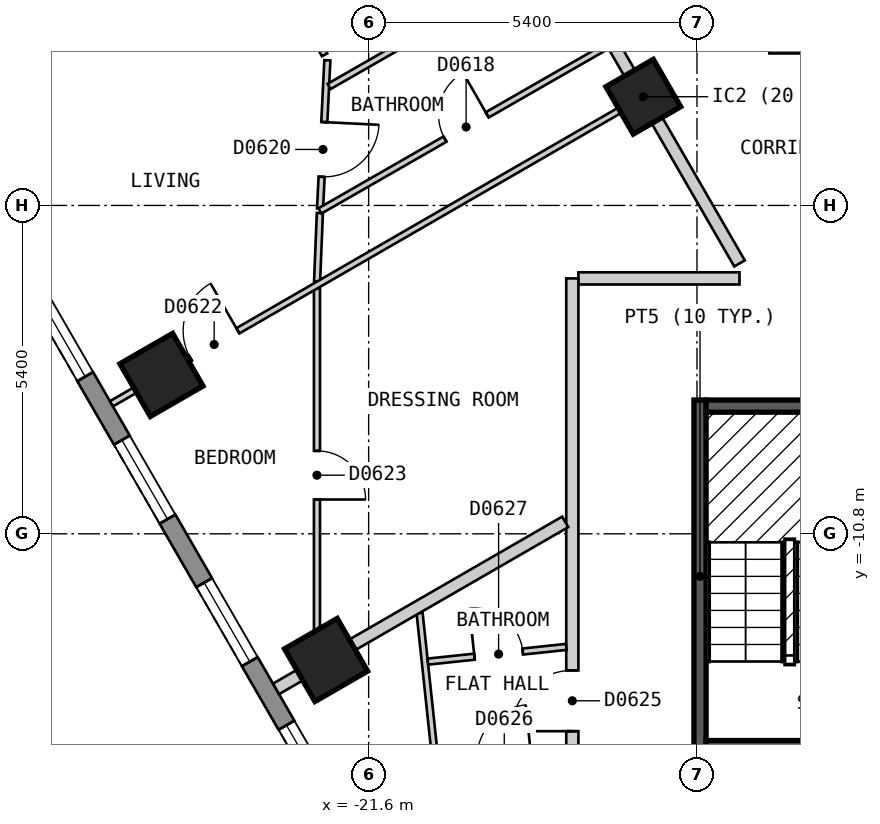
"""IFC4 building model, lengths in metres.
Left out: names, types, materials, properties, quantities, classifications, styles, units other than length and angle.
Written with IfcOpenShell. Run it as: python <this file> out.ifc"""

import sys

from ifc_helpers import new_model, si_unit, direction, frame, frame_2d, origin, origin_2d, place, context, subcontext, project, spatial, polyline, rectangle, outline, extrude, element, fill, save


model = new_model("IFC4")
c1 = context("Model", 3, precision=1e-05, world=origin(), true_north=direction((0.0, 1.0)))
c2 = subcontext(c1, "Body", "Model", "MODEL_VIEW")
j1 = project(units=[si_unit("LENGTHUNIT", "METRE"), si_unit("PLANEANGLEUNIT", "RADIAN")], contexts=[c1])
p1 = place(None, origin())
s1 = spatial("IfcSite", under=j1, at=p1, CompositionType="ELEMENT")
p2 = place(p1, origin())
s2 = spatial("IfcBuilding", under=s1, at=p2, CompositionType="ELEMENT")
p3 = place(p2, frame((0.0, 0.0, 75.0)))
s3 = spatial("IfcBuildingStorey", under=s2, at=p3, CompositionType="ELEMENT", Elevation=75.0)
for number, where, z_axis, x_axis in (
    (1, (-25.007, -8.187, 0.0), (0.0, 0.0, 1.0), (0.5, -0.866, 0.0)),
    (2, (-22.3, -12.875, 0.0), (0.0, 0.0, 1.0), (0.5, -0.866, 0.0)),
):
    element("IfcColumn", number, at=place(p3, frame(where, z_axis=z_axis, x_axis=x_axis)), inside=s3, PredefinedType="COLUMN", context=c2, shape_type="SweptSolid", body=[
        extrude(rectangle(XDim=1.0, YDim=1.0, at=origin_2d()), origin(), (0.0, 0.0, 1.0), 3.0),
    ])
p4 = place(p3, frame((-17.083, -3.612, 0.0), z_axis=(0.0, 0.0, 1.0), x_axis=(0.5, -0.866025403784, 0.0)))
e3 = element("IfcColumn", 3, at=p4, inside=s3, PredefinedType="COLUMN", context=c2, shape_type="SweptSolid", body=[
    extrude(rectangle(XDim=0.9, YDim=0.9, at=origin_2d()), origin(), (0.0, 0.0, 1.0), 3.0),
])
p5 = place(p3, frame((-29.027, -3.425, 0.0), z_axis=(0.0, 0.0, 1.0), x_axis=(0.500035407905, -0.866004960056, 0.0)))
e4 = element("IfcWall", 4, at=p5, inside=s3, PredefinedType="SOLIDWALL", context=c2, shape_type="SweptSolid", body=[
    extrude(outline(polyline([(0.0, -0.15), (23.094, -0.15), (23.014, 0.15), (0.08, 0.15), (0.0, -0.15)])), origin(), (0.0, 0.0, 1.0), 2.7),
])
p6 = place(p5, frame((1.324, 0.0, 0.15)))
e5 = element("IfcOpeningElement", 5, at=p6, cuts=e4, PredefinedType="OPENING", context=c2, shape_type="SweptSolid", body=[
    extrude(rectangle(XDim=1.5, YDim=2.1, at=frame_2d((0.75, 1.05))), frame((0.0, 0.16, 0.0), z_axis=(0.0, -1.0, 0.0), x_axis=(1.0, 0.0, 0.0)), (0.0, 0.0, 1.0), 0.32),
])
p7 = place(p5, frame((4.031, 0.0, 0.15)))
e6 = element("IfcOpeningElement", 6, at=p7, cuts=e4, PredefinedType="OPENING", context=c2, shape_type="SweptSolid", body=[
    extrude(rectangle(XDim=1.5, YDim=2.1, at=frame_2d((0.75, 1.05))), frame((0.0, 0.16, 0.0), z_axis=(0.0, -1.0, 0.0), x_axis=(1.0, 0.0, 0.0)), (0.0, 0.0, 1.0), 0.32),
])
p8 = place(p5, frame((6.737, 0.0, 0.15)))
e7 = element("IfcOpeningElement", 7, at=p8, cuts=e4, PredefinedType="OPENING", context=c2, shape_type="SweptSolid", body=[
    extrude(rectangle(XDim=1.5, YDim=2.1, at=frame_2d((0.75, 1.05))), frame((0.0, 0.16, 0.0), z_axis=(0.0, -1.0, 0.0), x_axis=(1.0, 0.0, 0.0)), (0.0, 0.0, 1.0), 0.32),
])
p9 = place(p5, frame((9.444, 0.0, 0.15)))
e8 = element("IfcOpeningElement", 8, at=p9, cuts=e4, PredefinedType="OPENING", context=c2, shape_type="SweptSolid", body=[
    extrude(rectangle(XDim=1.5, YDim=2.1, at=frame_2d((0.75, 1.05))), frame((0.0, 0.16, 0.0), z_axis=(0.0, -1.0, 0.0), x_axis=(1.0, 0.0, 0.0)), (0.0, 0.0, 1.0), 0.32),
])
p10 = place(p5, frame((12.151, 0.0, 0.15)))
e9 = element("IfcOpeningElement", 9, at=p10, cuts=e4, PredefinedType="OPENING", context=c2, shape_type="SweptSolid", body=[
    extrude(rectangle(XDim=1.5, YDim=2.1, at=frame_2d((0.75, 1.05))), frame((0.0, 0.16, 0.0), z_axis=(0.0, -1.0, 0.0), x_axis=(1.0, 0.0, 0.0)), (0.0, 0.0, 1.0), 0.32),
])
p11 = place(p5, frame((14.857, 0.0, 0.15)))
e10 = element("IfcOpeningElement", 10, at=p11, cuts=e4, PredefinedType="OPENING", context=c2, shape_type="SweptSolid", body=[
    extrude(rectangle(XDim=1.5, YDim=2.1, at=frame_2d((0.75, 1.05))), frame((0.0, 0.16, 0.0), z_axis=(0.0, -1.0, 0.0), x_axis=(1.0, 0.0, 0.0)), (0.0, 0.0, 1.0), 0.32),
])
p12 = place(p5, frame((17.564, 0.0, 0.15)))
e11 = element("IfcOpeningElement", 11, at=p12, cuts=e4, PredefinedType="OPENING", context=c2, shape_type="SweptSolid", body=[
    extrude(rectangle(XDim=1.5, YDim=2.1, at=frame_2d((0.75, 1.05))), frame((0.0, 0.16, 0.0), z_axis=(0.0, -1.0, 0.0), x_axis=(1.0, 0.0, 0.0)), (0.0, 0.0, 1.0), 0.32),
])
p13 = place(p5, frame((20.27, 0.0, 0.15)))
e12 = element("IfcOpeningElement", 12, at=p13, cuts=e4, PredefinedType="OPENING", context=c2, shape_type="SweptSolid", body=[
    extrude(rectangle(XDim=1.5, YDim=2.1, at=frame_2d((0.75, 1.05))), frame((0.0, 0.16, 0.0), z_axis=(0.0, -1.0, 0.0), x_axis=(1.0, 0.0, 0.0)), (0.0, 0.0, 1.0), 0.32),
])
p14 = place(p3, frame((-18.533, -1.101, 0.0), z_axis=(0.0, 0.0, 1.0), x_axis=(0.500022085096, -0.866012652573, 0.0)))
e13 = element("IfcWall", 13, at=p14, inside=s3, PredefinedType="PARTITIONING", context=c2, shape_type="SweptSolid", body=[
    extrude(rectangle(XDim=6.066, YDim=0.2, at=frame_2d((3.033, 0.0))), origin(), (0.0, 0.0, 1.0), 2.7),
])
p15 = place(p14, frame((0.532, 0.0, 0.0)))
e14 = element("IfcOpeningElement", 14, at=p15, cuts=e13, PredefinedType="OPENING", context=c2, shape_type="SweptSolid", body=[
    extrude(rectangle(XDim=1.0, YDim=2.1, at=frame_2d((0.5, 1.05))), frame((0.0, 0.11, 0.0), z_axis=(0.0, -1.0, 0.0), x_axis=(1.0, 0.0, 0.0)), (0.0, 0.0, 1.0), 0.22),
])
p16 = place(p3, frame((-18.15, -6.6, 0.0), z_axis=(0.0, 0.0, 1.0), x_axis=(1.0, 0.0, 0.0)))
e15 = element("IfcWall", 15, at=p16, inside=s3, PredefinedType="PARTITIONING", context=c2, shape_type="SweptSolid", body=[
    extrude(rectangle(XDim=2.649, YDim=0.2, at=frame_2d((1.324, 0.0))), origin(), (0.0, 0.0, 1.0), 2.7),
])
p17 = place(p3, frame((-15.011, -2.8, 0.0), z_axis=(0.0, 0.0, 1.0), x_axis=(1.0, 0.0, 0.0)))
e16 = element("IfcWall", 16, at=p17, inside=s3, PredefinedType="PARTITIONING", context=c2, shape_type="SweptSolid", body=[
    extrude(rectangle(XDim=7.982, YDim=0.2, at=frame_2d((3.991, 0.0))), origin(), (0.0, 0.0, 1.0), 2.7),
])
p18 = place(p3, frame((-18.25, -14.386, 0.0), z_axis=(0.0, 0.0, 1.0), x_axis=(0.0, 1.0, 0.0)))
e17 = element("IfcWall", 17, at=p18, inside=s3, PredefinedType="PARTITIONING", context=c2, shape_type="SweptSolid", body=[
    extrude(rectangle(XDim=7.786, YDim=0.2, at=frame_2d((3.893, 0.0))), origin(), (0.0, 0.0, 1.0), 2.7),
])
p19 = place(p18, frame((0.34, 0.0, 0.0)))
e18 = element("IfcOpeningElement", 18, at=p19, cuts=e17, PredefinedType="OPENING", context=c2, shape_type="SweptSolid", body=[
    extrude(rectangle(XDim=1.0, YDim=2.1, at=frame_2d((0.5, 1.05))), frame((0.0, 0.11, 0.0), z_axis=(0.0, -1.0, 0.0), x_axis=(1.0, 0.0, 0.0)), (0.0, 0.0, 1.0), 0.22),
])
p20 = place(p3, frame((-23.289, -1.054, 0.0), z_axis=(0.0, 0.0, 1.0), x_axis=(0.458226112305, -0.888835659726, 0.0)))
e19 = element("IfcWall", 19, at=p20, inside=s3, PredefinedType="PARTITIONING", context=c2, shape_type="SweptSolid", body=[
    extrude(rectangle(XDim=2.104, YDim=0.1, at=frame_2d((1.052, 0.0))), origin(), (0.0, 0.0, 1.0), 2.7),
])
p21 = place(p3, frame((-20.762, -12.102, 0.0), z_axis=(0.0, 0.0, 1.0), x_axis=(0.106118300401, -0.994353511745, 0.0)))
e20 = element("IfcWall", 20, at=p21, inside=s3, PredefinedType="PARTITIONING", context=c2, shape_type="SweptSolid", body=[
    extrude(rectangle(XDim=2.535, YDim=0.1, at=frame_2d((1.268, 0.0))), origin(), (0.0, 0.0, 1.0), 2.7),
])
p22 = place(p3, frame((-20.626, -12.902, 0.0), z_axis=(0.0, 0.0, 1.0), x_axis=(0.994385570266, 0.105817473257, 0.0)))
e21 = element("IfcWall", 21, at=p22, inside=s3, PredefinedType="PARTITIONING", context=c2, shape_type="SweptSolid", body=[
    extrude(rectangle(XDim=2.289, YDim=0.1, at=frame_2d((1.145, 0.0))), origin(), (0.0, 0.0, 1.0), 2.7),
])
p23 = place(p22, frame((0.77, 0.0, 0.0)))
e22 = element("IfcOpeningElement", 22, at=p23, cuts=e21, PredefinedType="OPENING", context=c2, shape_type="SweptSolid", body=[
    extrude(rectangle(XDim=0.8, YDim=2.1, at=frame_2d((0.4, 1.05))), frame((0.0, 0.06, 0.0), z_axis=(0.0, -1.0, 0.0), x_axis=(1.0, 0.0, 0.0)), (0.0, 0.0, 1.0), 0.12),
])
p24 = place(p3, frame((-22.399, -5.45, 0.0), z_axis=(0.0, 0.0, 1.0), x_axis=(0.049129140995, 0.998792434646, 0.0)))
e23 = element("IfcWall", 23, at=p24, inside=s3, PredefinedType="PARTITIONING", context=c2, shape_type="SweptSolid", body=[
    extrude(rectangle(XDim=2.44, YDim=0.1, at=frame_2d((1.22, 0.0))), origin(), (0.0, 0.0, 1.0), 2.7),
])
p25 = place(p24, frame((0.522, 0.0, 0.0)))
e24 = element("IfcOpeningElement", 24, at=p25, cuts=e23, PredefinedType="OPENING", context=c2, shape_type="SweptSolid", body=[
    extrude(rectangle(XDim=0.9, YDim=2.1, at=frame_2d((0.45, 1.05))), frame((0.0, 0.06, 0.0), z_axis=(0.0, -1.0, 0.0), x_axis=(1.0, 0.0, 0.0)), (0.0, 0.0, 1.0), 0.12),
])
p26 = place(p3, frame((-22.448, -6.651, 0.0), z_axis=(0.0, 0.0, 1.0), x_axis=(0.040729401597, 0.99917021365, 0.0)))
e25 = element("IfcWall", 25, at=p26, inside=s3, PredefinedType="PARTITIONING", context=c2, shape_type="SweptSolid", body=[
    extrude(rectangle(XDim=1.127, YDim=0.1, at=frame_2d((0.563, 0.0))), origin(), (0.0, 0.0, 1.0), 2.7),
])
p27 = place(p3, frame((-22.45, -12.846, 0.0), z_axis=(0.0, 0.0, 1.0), x_axis=(0.0, 1.0, 0.0)))
e26 = element("IfcWall", 26, at=p27, inside=s3, PredefinedType="PARTITIONING", context=c2, shape_type="SweptSolid", body=[
    extrude(rectangle(XDim=6.078, YDim=0.1, at=frame_2d((3.039, 0.0))), origin(), (0.0, 0.0, 1.0), 2.7),
])
p28 = place(p27, frame((2.61, 0.0, 0.0)))
e27 = element("IfcOpeningElement", 27, at=p28, cuts=e26, PredefinedType="OPENING", context=c2, shape_type="SweptSolid", body=[
    extrude(rectangle(XDim=0.8, YDim=2.1, at=frame_2d((0.4, 1.05))), frame((0.0, 0.06, 0.0), z_axis=(0.0, -1.0, 0.0), x_axis=(1.0, 0.0, 0.0)), (0.0, 0.0, 1.0), 0.12),
])
p29 = place(p3, frame((-25.83, -8.662, 0.0), z_axis=(0.0, 0.0, 1.0), x_axis=(0.866022959057, 0.500004234368, 0.0)))
e28 = element("IfcWall", 28, at=p29, inside=s3, PredefinedType="PARTITIONING", context=c2, shape_type="SweptSolid", body=[
    extrude(rectangle(XDim=10.0, YDim=0.1, at=frame_2d((5.0, 0.0))), origin(), (0.0, 0.0, 1.0), 2.7),
])
p30 = place(p29, frame((1.501, 0.0, 0.0)))
e29 = element("IfcOpeningElement", 29, at=p30, cuts=e28, PredefinedType="OPENING", context=c2, shape_type="SweptSolid", body=[
    extrude(rectangle(XDim=0.9, YDim=2.1, at=frame_2d((0.45, 1.05))), frame((0.0, 0.06, 0.0), z_axis=(0.0, -1.0, 0.0), x_axis=(1.0, 0.0, 0.0)), (0.0, 0.0, 1.0), 0.12),
])
p31 = place(p3, frame((-22.401, -5.49, 0.0), z_axis=(0.0, 0.0, 1.0), x_axis=(0.867314404256, 0.497760709749, 0.0)))
e30 = element("IfcWall", 30, at=p31, inside=s3, PredefinedType="PARTITIONING", context=c2, shape_type="SweptSolid", body=[
    extrude(rectangle(XDim=5.444, YDim=0.1, at=frame_2d((2.722, 0.0))), origin(), (0.0, 0.0, 1.0), 2.7),
])
p32 = place(p31, frame((2.372, 0.0, 0.0)))
e31 = element("IfcOpeningElement", 31, at=p32, cuts=e30, PredefinedType="OPENING", context=c2, shape_type="SweptSolid", body=[
    extrude(rectangle(XDim=0.8, YDim=2.1, at=frame_2d((0.4, 1.05))), frame((0.0, 0.06, 0.0), z_axis=(0.0, -1.0, 0.0), x_axis=(1.0, 0.0, 0.0)), (0.0, 0.0, 1.0), 0.12),
])
p33 = place(p3, frame((-22.25, -3.443, 0.0), z_axis=(0.0, 0.0, 1.0), x_axis=(0.867362741349, 0.497676476156, 0.0)))
e32 = element("IfcWall", 32, at=p33, inside=s3, PredefinedType="PARTITIONING", context=c2, shape_type="SweptSolid", body=[
    extrude(rectangle(XDim=4.29, YDim=0.1, at=frame_2d((2.145, 0.0))), origin(), (0.0, 0.0, 1.0), 2.7),
])
p34 = place(p33, frame((1.715, 0.0, 0.0)))
e33 = element("IfcOpeningElement", 33, at=p34, cuts=e32, PredefinedType="OPENING", context=c2, shape_type="SweptSolid", body=[
    extrude(rectangle(XDim=0.9, YDim=2.1, at=frame_2d((0.45, 1.05))), frame((0.0, 0.06, 0.0), z_axis=(0.0, -1.0, 0.0), x_axis=(1.0, 0.0, 0.0)), (0.0, 0.0, 1.0), 0.12),
])
p35 = place(p3, frame((-23.123, -13.35, 0.0), z_axis=(0.0, 0.0, 1.0), x_axis=(0.866013095437, 0.500021318078, 0.0)))
e34 = element("IfcWall", 34, at=p35, inside=s3, PredefinedType="PARTITIONING", context=c2, shape_type="SweptSolid", body=[
    extrude(rectangle(XDim=5.492, YDim=0.2, at=frame_2d((2.746, 0.0))), origin(), (0.0, 0.0, 1.0), 2.7),
])
p36 = place(p3, frame((-16.15, -14.4, 0.0), z_axis=(0.0, 0.0, 1.0), x_axis=(0.0, 1.0, 0.0)))
e35 = element("IfcWall", 35, at=p36, inside=s3, PredefinedType="SOLIDWALL", context=c2, shape_type="SweptSolid", body=[
    extrude(rectangle(XDim=5.8, YDim=0.2, at=frame_2d((2.9, 0.0))), origin(), (0.0, 0.0, 1.0), 2.7),
])
for number, where, z_axis, x_axis in (
    (36, (-16.05, -14.3, 0.0), (0.0, 0.0, 1.0), (1.0, 0.0, 0.0)),
    (37, (-16.05, -8.7, 0.0), (0.0, 0.0, 1.0), (1.0, 0.0, 0.0)),
):
    element("IfcWall", number, at=place(p3, frame(where, z_axis=z_axis, x_axis=x_axis)), inside=s3, PredefinedType="SOLIDWALL", context=c2, shape_type="SweptSolid", body=[
        extrude(rectangle(XDim=2.75, YDim=0.2, at=frame_2d((1.375, 0.0))), origin(), (0.0, 0.0, 1.0), 2.7),
    ])
p37 = place(p7, origin())
e38 = element("IfcWindow", 38, at=p37, inside=s3, PartitioningType="SINGLE_PANEL", PredefinedType="WINDOW", context=c2, shape_type="SweptSolid", body=[
    extrude(rectangle(XDim=1.5, YDim=2.1, at=frame_2d((0.75, 1.05))), frame((0.0, 0.03, 0.0), z_axis=(0.0, -1.0, 0.0), x_axis=(1.0, 0.0, 0.0)), (0.0, 0.0, 1.0), 0.06),
])
fill(e6, e38)
p38 = place(p8, origin())
e39 = element("IfcWindow", 39, at=p38, inside=s3, PartitioningType="SINGLE_PANEL", PredefinedType="WINDOW", context=c2, shape_type="SweptSolid", body=[
    extrude(rectangle(XDim=1.5, YDim=2.1, at=frame_2d((0.75, 1.05))), frame((0.0, 0.03, 0.0), z_axis=(0.0, -1.0, 0.0), x_axis=(1.0, 0.0, 0.0)), (0.0, 0.0, 1.0), 0.06),
])
fill(e7, e39)
p39 = place(p9, origin())
e40 = element("IfcWindow", 40, at=p39, inside=s3, PartitioningType="SINGLE_PANEL", PredefinedType="WINDOW", context=c2, shape_type="SweptSolid", body=[
    extrude(rectangle(XDim=1.5, YDim=2.1, at=frame_2d((0.75, 1.05))), frame((0.0, 0.03, 0.0), z_axis=(0.0, -1.0, 0.0), x_axis=(1.0, 0.0, 0.0)), (0.0, 0.0, 1.0), 0.06),
])
fill(e8, e40)
p40 = place(p10, origin())
e41 = element("IfcWindow", 41, at=p40, inside=s3, PartitioningType="SINGLE_PANEL", PredefinedType="WINDOW", context=c2, shape_type="SweptSolid", body=[
    extrude(rectangle(XDim=1.5, YDim=2.1, at=frame_2d((0.75, 1.05))), frame((0.0, 0.03, 0.0), z_axis=(0.0, -1.0, 0.0), x_axis=(1.0, 0.0, 0.0)), (0.0, 0.0, 1.0), 0.06),
])
fill(e9, e41)
p41 = place(p32, origin())
e42 = element("IfcDoor", 42, at=p41, inside=s3, OperationType="SINGLE_SWING_RIGHT", PredefinedType="DOOR", context=c2, shape_type="SweptSolid", body=[
    extrude(rectangle(XDim=0.8, YDim=2.1, at=frame_2d((0.4, 1.05))), frame((0.0, 0.025, 0.0), z_axis=(0.0, -1.0, 0.0), x_axis=(1.0, 0.0, 0.0)), (0.0, 0.0, 1.0), 0.05),
])
fill(e31, e42)
p42 = place(p25, origin())
e43 = element("IfcDoor", 43, at=p42, inside=s3, OperationType="SINGLE_SWING_RIGHT", PredefinedType="DOOR", context=c2, shape_type="SweptSolid", body=[
    extrude(rectangle(XDim=0.9, YDim=2.1, at=frame_2d((0.45, 1.05))), frame((0.0, 0.025, 0.0), z_axis=(0.0, -1.0, 0.0), x_axis=(1.0, 0.0, 0.0)), (0.0, 0.0, 1.0), 0.05),
])
fill(e24, e43)
p43 = place(p30, origin())
e44 = element("IfcDoor", 44, at=p43, inside=s3, OperationType="SINGLE_SWING_RIGHT", PredefinedType="DOOR", context=c2, shape_type="SweptSolid", body=[
    extrude(rectangle(XDim=0.9, YDim=2.1, at=frame_2d((0.45, 1.05))), frame((0.0, 0.025, 0.0), z_axis=(0.0, -1.0, 0.0), x_axis=(1.0, 0.0, 0.0)), (0.0, 0.0, 1.0), 0.05),
])
fill(e29, e44)
p44 = place(p28, origin())
e45 = element("IfcDoor", 45, at=p44, inside=s3, OperationType="SINGLE_SWING_LEFT", PredefinedType="DOOR", context=c2, shape_type="SweptSolid", body=[
    extrude(rectangle(XDim=0.8, YDim=2.1, at=frame_2d((0.4, 1.05))), frame((0.0, 0.025, 0.0), z_axis=(0.0, -1.0, 0.0), x_axis=(1.0, 0.0, 0.0)), (0.0, 0.0, 1.0), 0.05),
])
fill(e27, e45)
p45 = place(p19, origin())
e46 = element("IfcDoor", 46, at=p45, inside=s3, OperationType="SINGLE_SWING_LEFT", PredefinedType="DOOR", context=c2, shape_type="SweptSolid", body=[
    extrude(rectangle(XDim=1.0, YDim=2.1, at=frame_2d((0.5, 1.05))), frame((0.0, 0.025, 0.0), z_axis=(0.0, -1.0, 0.0), x_axis=(1.0, 0.0, 0.0)), (0.0, 0.0, 1.0), 0.05),
])
fill(e18, e46)
p46 = place(p23, origin())
e47 = element("IfcDoor", 47, at=p46, inside=s3, OperationType="SINGLE_SWING_LEFT", PredefinedType="DOOR", context=c2, shape_type="SweptSolid", body=[
    extrude(rectangle(XDim=0.8, YDim=2.1, at=frame_2d((0.4, 1.05))), frame((0.0, 0.025, 0.0), z_axis=(0.0, -1.0, 0.0), x_axis=(1.0, 0.0, 0.0)), (0.0, 0.0, 1.0), 0.05),
])
fill(e22, e47)
save(model, sys.argv[1])
